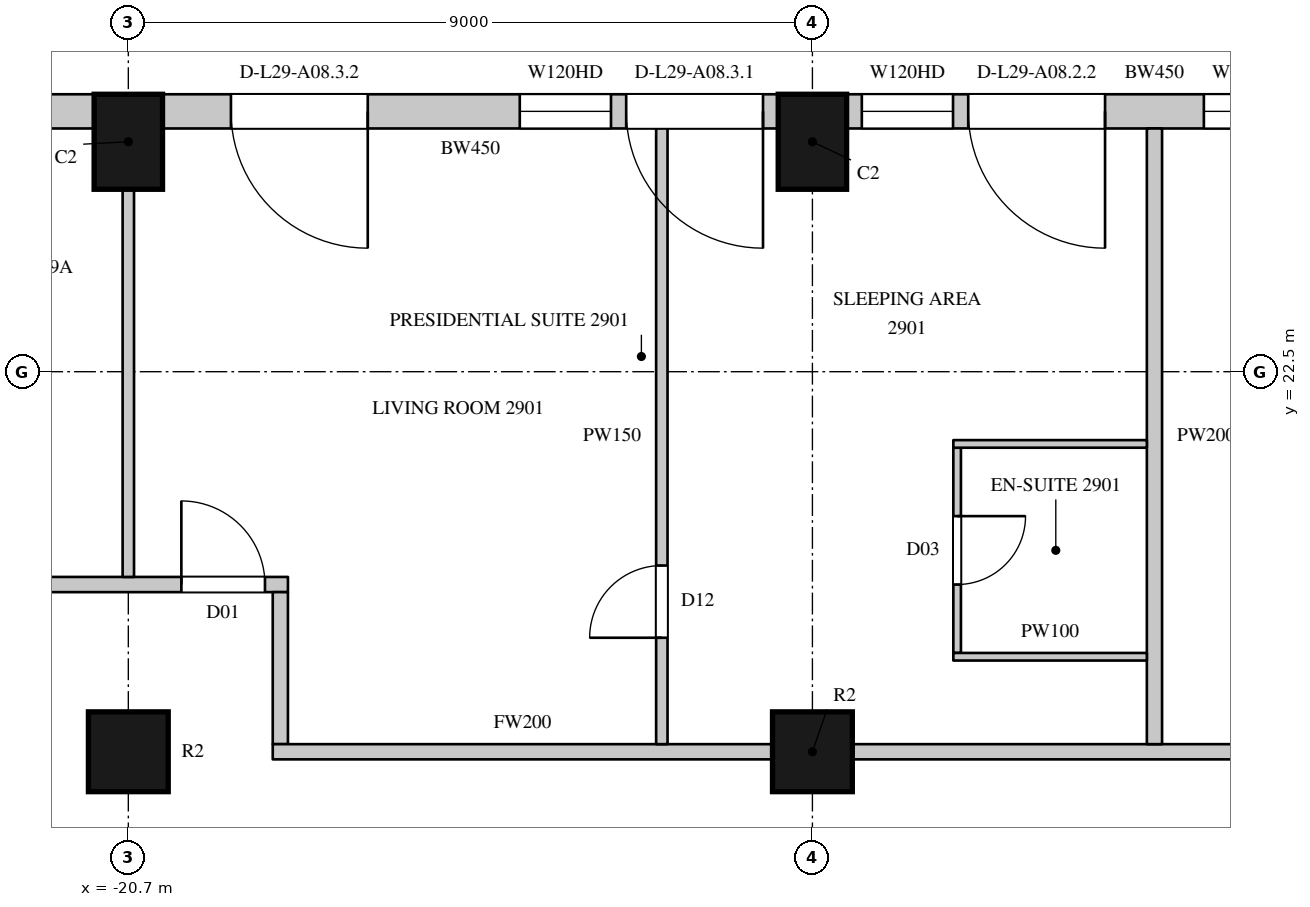
"""IFC4 building model, lengths in metres.
Left out: names, types, materials, properties, quantities, classifications, styles, units other than length and angle.
Written with IfcOpenShell. Run it as: python <this file> out.ifc"""

import sys

from ifc_helpers import new_model, si_unit, direction, frame, frame_2d, origin, origin_2d, place, context, subcontext, project, spatial, rectangle, circle, extrude, element, fill, save


model = new_model("IFC4")
c1 = context("Model", 3, precision=1e-05, world=origin(), true_north=direction((0.0, 1.0)))
c2 = subcontext(c1, "Body", "Model", "MODEL_VIEW")
j1 = project(units=[si_unit("LENGTHUNIT", "METRE"), si_unit("PLANEANGLEUNIT", "RADIAN")], contexts=[c1])
p1 = place(None, origin())
s1 = spatial("IfcSite", under=j1, at=p1, CompositionType="ELEMENT")
p2 = place(p1, origin())
s2 = spatial("IfcBuilding", under=s1, at=p2, CompositionType="ELEMENT")
p3 = place(p2, frame((0.0, 0.0, 134.7)))
s3 = spatial("IfcBuildingStorey", under=s2, at=p3, CompositionType="ELEMENT", Elevation=134.7)
for number, where, z_axis, x_axis in (
    (1, (-11.7, 25.525, 0.0), (0.0, 0.0, 1.0), (-1.0, 0.0, 0.0)),
    (2, (-20.7, 25.525, 0.0), (0.0, 0.0, 1.0), (-1.0, 0.0, 0.0)),
):
    element("IfcColumn", number, at=place(p3, frame(where, z_axis=z_axis, x_axis=x_axis)), inside=s3, PredefinedType="COLUMN", context=c2, shape_type="SweptSolid", body=[
        extrude(rectangle(XDim=0.9, YDim=1.25, at=origin_2d()), origin(), (0.0, 0.0, 1.0), 3.6),
    ])
for number, where, z_axis, x_axis in (
    (3, (-20.7, 17.5, 0.0), (0.0, 0.0, 1.0), (1.0, 0.0, 0.0)),
    (4, (-11.7, 17.5, 0.0), (0.0, 0.0, 1.0), (1.0, 0.0, 0.0)),
):
    element("IfcColumn", number, at=place(p3, frame(where, z_axis=z_axis, x_axis=x_axis)), inside=s3, PredefinedType="COLUMN", context=c2, shape_type="SweptSolid", body=[
        extrude(circle(Radius=0.525, at=origin_2d()), origin(), (0.0, 0.0, 1.0), 3.6),
    ])
p4 = place(p3, frame((-3.15, 25.925, 0.0), z_axis=(0.0, 0.0, 1.0), x_axis=(-1.0, 0.0, 0.0)))
e5 = element("IfcWall", 5, at=p4, inside=s3, PredefinedType="SOLIDWALL", context=c2, shape_type="SweptSolid", body=[
    extrude(rectangle(XDim=8.1, YDim=0.45, at=frame_2d((4.05, 0.0))), origin(), (0.0, 0.0, 1.0), 3.3),
])
p5 = place(p4, frame((0.2, 0.0, 0.0)))
e6 = element("IfcOpeningElement", 6, at=p5, cuts=e5, PredefinedType="OPENING", context=c2, shape_type="SweptSolid", body=[
    extrude(rectangle(XDim=1.8, YDim=2.4, at=frame_2d((0.9, 1.2))), frame((0.0, 0.235, 0.0), z_axis=(0.0, -1.0, 0.0), x_axis=(1.0, 0.0, 0.0)), (0.0, 0.0, 1.0), 0.47),
])
p6 = place(p4, frame((2.2, 0.0, 1.05)))
e7 = element("IfcOpeningElement", 7, at=p6, cuts=e5, PredefinedType="OPENING", context=c2, shape_type="SweptSolid", body=[
    extrude(rectangle(XDim=1.2, YDim=2.0, at=frame_2d((0.6, 1.0))), frame((0.0, 0.235, 0.0), z_axis=(0.0, -1.0, 0.0), x_axis=(1.0, 0.0, 0.0)), (0.0, 0.0, 1.0), 0.47),
])
p7 = place(p4, frame((4.7, 0.0, 0.0)))
e8 = element("IfcOpeningElement", 8, at=p7, cuts=e5, PredefinedType="OPENING", context=c2, shape_type="SweptSolid", body=[
    extrude(rectangle(XDim=1.8, YDim=2.4, at=frame_2d((0.9, 1.2))), frame((0.0, 0.235, 0.0), z_axis=(0.0, -1.0, 0.0), x_axis=(1.0, 0.0, 0.0)), (0.0, 0.0, 1.0), 0.47),
])
p8 = place(p4, frame((6.7, 0.0, 1.05)))
e9 = element("IfcOpeningElement", 9, at=p8, cuts=e5, PredefinedType="OPENING", context=c2, shape_type="SweptSolid", body=[
    extrude(rectangle(XDim=1.2, YDim=2.0, at=frame_2d((0.6, 1.0))), frame((0.0, 0.235, 0.0), z_axis=(0.0, -1.0, 0.0), x_axis=(1.0, 0.0, 0.0)), (0.0, 0.0, 1.0), 0.47),
])
p9 = place(p3, frame((-12.15, 25.925, 0.0), z_axis=(0.0, 0.0, 1.0), x_axis=(-1.0, 0.0, 0.0)))
e10 = element("IfcWall", 10, at=p9, inside=s3, PredefinedType="SOLIDWALL", context=c2, shape_type="SweptSolid", body=[
    extrude(rectangle(XDim=8.1, YDim=0.45, at=frame_2d((4.05, 0.0))), origin(), (0.0, 0.0, 1.0), 3.3),
])
p10 = place(p9, frame((0.2, 0.0, 0.0)))
e11 = element("IfcOpeningElement", 11, at=p10, cuts=e10, PredefinedType="OPENING", context=c2, shape_type="SweptSolid", body=[
    extrude(rectangle(XDim=1.8, YDim=2.4, at=frame_2d((0.9, 1.2))), frame((0.0, 0.235, 0.0), z_axis=(0.0, -1.0, 0.0), x_axis=(1.0, 0.0, 0.0)), (0.0, 0.0, 1.0), 0.47),
])
p11 = place(p9, frame((2.2, 0.0, 1.05)))
e12 = element("IfcOpeningElement", 12, at=p11, cuts=e10, PredefinedType="OPENING", context=c2, shape_type="SweptSolid", body=[
    extrude(rectangle(XDim=1.2, YDim=2.0, at=frame_2d((0.6, 1.0))), frame((0.0, 0.235, 0.0), z_axis=(0.0, -1.0, 0.0), x_axis=(1.0, 0.0, 0.0)), (0.0, 0.0, 1.0), 0.47),
])
p12 = place(p9, frame((5.4, 0.0, 0.0)))
e13 = element("IfcOpeningElement", 13, at=p12, cuts=e10, PredefinedType="OPENING", context=c2, shape_type="SweptSolid", body=[
    extrude(rectangle(XDim=1.8, YDim=2.4, at=frame_2d((0.9, 1.2))), frame((0.0, 0.235, 0.0), z_axis=(0.0, -1.0, 0.0), x_axis=(1.0, 0.0, 0.0)), (0.0, 0.0, 1.0), 0.47),
])
p13 = place(p3, frame((-21.15, 25.925, 0.0), z_axis=(0.0, 0.0, 1.0), x_axis=(-1.0, 0.0, 0.0)))
e14 = element("IfcWall", 14, at=p13, inside=s3, PredefinedType="SOLIDWALL", context=c2, shape_type="SweptSolid", body=[
    extrude(rectangle(XDim=2.914, YDim=0.45, at=frame_2d((1.457, 0.0))), origin(), (0.0, 0.0, 1.0), 3.3),
])
p14 = place(p3, frame((-23.752, 19.7, 0.0), z_axis=(0.0, 0.0, 1.0), x_axis=(1.0, 0.0, 0.0)))
e15 = element("IfcWall", 15, at=p14, inside=s3, PredefinedType="PARTITIONING", context=c2, shape_type="SweptSolid", body=[
    extrude(rectangle(XDim=5.152, YDim=0.2, at=frame_2d((2.576, 0.0))), origin(), (0.0, 0.0, 1.0), 3.3),
])
p15 = place(p14, frame((0.85, 0.0, 0.0)))
e16 = element("IfcOpeningElement", 16, at=p15, cuts=e15, PredefinedType="OPENING", context=c2, shape_type="SweptSolid", body=[
    extrude(rectangle(XDim=0.9, YDim=2.2, at=frame_2d((0.45, 1.1))), frame((0.0, 0.11, 0.0), z_axis=(0.0, -1.0, 0.0), x_axis=(1.0, 0.0, 0.0)), (0.0, 0.0, 1.0), 0.22),
])
p16 = place(p14, frame((3.75, 0.0, 0.0)))
e17 = element("IfcOpeningElement", 17, at=p16, cuts=e15, PredefinedType="OPENING", context=c2, shape_type="SweptSolid", body=[
    extrude(rectangle(XDim=1.1, YDim=2.4, at=frame_2d((0.55, 1.2))), frame((0.0, 0.11, 0.0), z_axis=(0.0, -1.0, 0.0), x_axis=(1.0, 0.0, 0.0)), (0.0, 0.0, 1.0), 0.22),
])
p17 = place(p3, frame((-18.7, 17.6, 0.0), z_axis=(0.0, 0.0, 1.0), x_axis=(0.0, 1.0, 0.0)))
e18 = element("IfcWall", 18, at=p17, inside=s3, PredefinedType="PARTITIONING", context=c2, shape_type="SweptSolid", body=[
    extrude(rectangle(XDim=2.0, YDim=0.2, at=frame_2d((1.0, 0.0))), origin(), (0.0, 0.0, 1.0), 3.3),
])
p18 = place(p3, frame((-18.8, 17.5, 0.0), z_axis=(0.0, 0.0, 1.0), x_axis=(1.0, 0.0, 0.0)))
e19 = element("IfcWall", 19, at=p18, inside=s3, PredefinedType="PARTITIONING", context=c2, shape_type="SweptSolid", body=[
    extrude(rectangle(XDim=6.575, YDim=0.2, at=frame_2d((3.288, 0.0))), origin(), (0.0, 0.0, 1.0), 2.75),
])
p19 = place(p3, frame((-11.175, 17.5, 0.0), z_axis=(0.0, 0.0, 1.0), x_axis=(1.0, 0.0, 0.0)))
e20 = element("IfcWall", 20, at=p19, inside=s3, PredefinedType="PARTITIONING", context=c2, shape_type="SweptSolid", body=[
    extrude(rectangle(XDim=7.95, YDim=0.2, at=frame_2d((3.975, 0.0))), origin(), (0.0, 0.0, 1.0), 2.75),
])
p20 = place(p19, frame((5.2, 0.0, 0.0)))
e21 = element("IfcOpeningElement", 21, at=p20, cuts=e20, PredefinedType="OPENING", context=c2, shape_type="SweptSolid", body=[
    extrude(rectangle(XDim=1.1, YDim=2.4, at=frame_2d((0.55, 1.2))), frame((0.0, 0.11, 0.0), z_axis=(0.0, -1.0, 0.0), x_axis=(1.0, 0.0, 0.0)), (0.0, 0.0, 1.0), 0.22),
])
p21 = place(p3, frame((-20.7, 19.8, 0.0), z_axis=(0.0, 0.0, 1.0), x_axis=(0.0, 1.0, 0.0)))
e22 = element("IfcWall", 22, at=p21, inside=s3, PredefinedType="PARTITIONING", context=c2, shape_type="SweptSolid", body=[
    extrude(rectangle(XDim=5.1, YDim=0.15, at=frame_2d((2.55, 0.0))), origin(), (0.0, 0.0, 1.0), 2.75),
])
p22 = place(p3, frame((-13.681, 17.6, 0.0), z_axis=(0.0, 0.0, 1.0), x_axis=(0.0, 1.0, 0.0)))
e23 = element("IfcWall", 23, at=p22, inside=s3, PredefinedType="PARTITIONING", context=c2, shape_type="SweptSolid", body=[
    extrude(rectangle(XDim=8.1, YDim=0.15, at=frame_2d((4.05, 0.0))), origin(), (0.0, 0.0, 1.0), 3.3),
])
p23 = place(p22, frame((1.4, 0.0, 0.0)))
e24 = element("IfcOpeningElement", 24, at=p23, cuts=e23, PredefinedType="OPENING", context=c2, shape_type="SweptSolid", body=[
    extrude(rectangle(XDim=0.95, YDim=2.2, at=frame_2d((0.475, 1.1))), frame((0.0, 0.085, 0.0), z_axis=(0.0, -1.0, 0.0), x_axis=(1.0, 0.0, 0.0)), (0.0, 0.0, 1.0), 0.17),
])
p24 = place(p3, frame((-7.2, 17.6, 0.0), z_axis=(0.0, 0.0, 1.0), x_axis=(0.0, 1.0, 0.0)))
e25 = element("IfcWall", 25, at=p24, inside=s3, PredefinedType="PARTITIONING", context=c2, shape_type="SweptSolid", body=[
    extrude(rectangle(XDim=8.1, YDim=0.2, at=frame_2d((4.05, 0.0))), origin(), (0.0, 0.0, 1.0), 2.65),
])
p25 = place(p3, frame((-9.796, 18.8, 0.0), z_axis=(0.0, 0.0, 1.0), x_axis=(0.0, 1.0, 0.0)))
e26 = element("IfcWall", 26, at=p25, inside=s3, PredefinedType="PARTITIONING", context=c2, shape_type="SweptSolid", body=[
    extrude(rectangle(XDim=2.7, YDim=0.1, at=frame_2d((1.35, 0.0))), origin(), (0.0, 0.0, 1.0), 3.3),
])
p26 = place(p25, frame((0.9, 0.0, 0.0)))
e27 = element("IfcOpeningElement", 27, at=p26, cuts=e26, PredefinedType="OPENING", context=c2, shape_type="SweptSolid", body=[
    extrude(rectangle(XDim=0.9, YDim=2.2, at=frame_2d((0.45, 1.1))), frame((0.0, 0.06, 0.0), z_axis=(0.0, -1.0, 0.0), x_axis=(1.0, 0.0, 0.0)), (0.0, 0.0, 1.0), 0.12),
])
for number, where, z_axis, x_axis in (
    (28, (-9.846, 18.75, 0.0), (0.0, 0.0, 1.0), (1.0, 0.0, 0.0)),
    (29, (-9.846, 21.55, 0.0), (0.0, 0.0, 1.0), (1.0, 0.0, 0.0)),
):
    element("IfcWall", number, at=place(p3, frame(where, z_axis=z_axis, x_axis=x_axis)), inside=s3, PredefinedType="PARTITIONING", context=c2, shape_type="SweptSolid", body=[
        extrude(rectangle(XDim=2.546, YDim=0.1, at=frame_2d((1.273, 0.0))), origin(), (0.0, 0.0, 1.0), 3.3),
    ])
p27 = place(p6, origin())
e30 = element("IfcWindow", 30, at=p27, inside=s3, PartitioningType="SINGLE_PANEL", PredefinedType="WINDOW", context=c2, shape_type="SweptSolid", body=[
    extrude(rectangle(XDim=1.2, YDim=2.0, at=frame_2d((0.6, 1.0))), frame((0.0, 0.135, 0.0), z_axis=(0.0, -1.0, 0.0), x_axis=(1.0, 0.0, 0.0)), (0.0, 0.0, 1.0), 0.06),
])
fill(e7, e30)
p28 = place(p7, origin())
e31 = element("IfcDoor", 31, at=p28, inside=s3, OperationType="SLIDING_TO_LEFT", PredefinedType="DOOR", context=c2, shape_type="SweptSolid", body=[
    extrude(rectangle(XDim=1.8, YDim=2.4, at=frame_2d((0.9, 1.2))), frame((0.0, 0.13, 0.0), z_axis=(0.0, -1.0, 0.0), x_axis=(1.0, 0.0, 0.0)), (0.0, 0.0, 1.0), 0.05),
])
fill(e8, e31)
p29 = place(p8, origin())
e32 = element("IfcWindow", 32, at=p29, inside=s3, PartitioningType="SINGLE_PANEL", PredefinedType="WINDOW", context=c2, shape_type="SweptSolid", body=[
    extrude(rectangle(XDim=1.2, YDim=2.0, at=frame_2d((0.6, 1.0))), frame((0.0, 0.135, 0.0), z_axis=(0.0, -1.0, 0.0), x_axis=(1.0, 0.0, 0.0)), (0.0, 0.0, 1.0), 0.06),
])
fill(e9, e32)
p30 = place(p10, origin())
e33 = element("IfcDoor", 33, at=p30, inside=s3, OperationType="SLIDING_TO_LEFT", PredefinedType="DOOR", context=c2, shape_type="SweptSolid", body=[
    extrude(rectangle(XDim=1.8, YDim=2.4, at=frame_2d((0.9, 1.2))), frame((0.0, 0.13, 0.0), z_axis=(0.0, -1.0, 0.0), x_axis=(1.0, 0.0, 0.0)), (0.0, 0.0, 1.0), 0.05),
])
fill(e11, e33)
p31 = place(p11, origin())
e34 = element("IfcWindow", 34, at=p31, inside=s3, PartitioningType="SINGLE_PANEL", PredefinedType="WINDOW", context=c2, shape_type="SweptSolid", body=[
    extrude(rectangle(XDim=1.2, YDim=2.0, at=frame_2d((0.6, 1.0))), frame((0.0, 0.135, 0.0), z_axis=(0.0, -1.0, 0.0), x_axis=(1.0, 0.0, 0.0)), (0.0, 0.0, 1.0), 0.06),
])
fill(e12, e34)
p32 = place(p12, origin())
e35 = element("IfcDoor", 35, at=p32, inside=s3, OperationType="SLIDING_TO_LEFT", PredefinedType="DOOR", context=c2, shape_type="SweptSolid", body=[
    extrude(rectangle(XDim=1.8, YDim=2.4, at=frame_2d((0.9, 1.2))), frame((0.0, 0.13, 0.0), z_axis=(0.0, -1.0, 0.0), x_axis=(1.0, 0.0, 0.0)), (0.0, 0.0, 1.0), 0.05),
])
fill(e13, e35)
p33 = place(p16, origin())
e36 = element("IfcDoor", 36, at=p33, inside=s3, OperationType="SINGLE_SWING_LEFT", PredefinedType="DOOR", context=c2, shape_type="SweptSolid", body=[
    extrude(rectangle(XDim=1.1, YDim=2.4, at=frame_2d((0.55, 1.2))), frame((0.0, 0.025, 0.0), z_axis=(0.0, -1.0, 0.0), x_axis=(1.0, 0.0, 0.0)), (0.0, 0.0, 1.0), 0.05),
])
fill(e17, e36)
p34 = place(p23, origin())
e37 = element("IfcDoor", 37, at=p34, inside=s3, OperationType="SINGLE_SWING_LEFT", PredefinedType="DOOR", context=c2, shape_type="SweptSolid", body=[
    extrude(rectangle(XDim=0.95, YDim=2.2, at=frame_2d((0.475, 1.1))), frame((0.0, 0.025, 0.0), z_axis=(0.0, -1.0, 0.0), x_axis=(1.0, 0.0, 0.0)), (0.0, 0.0, 1.0), 0.05),
])
fill(e24, e37)
p35 = place(p26, origin())
e38 = element("IfcDoor", 38, at=p35, inside=s3, OperationType="SINGLE_SWING_LEFT", PredefinedType="DOOR", context=c2, shape_type="SweptSolid", body=[
    extrude(rectangle(XDim=0.9, YDim=2.2, at=frame_2d((0.45, 1.1))), frame((0.0, 0.025, 0.0), z_axis=(0.0, -1.0, 0.0), x_axis=(1.0, 0.0, 0.0)), (0.0, 0.0, 1.0), 0.05),
])
fill(e27, e38)
save(model, sys.argv[1])
